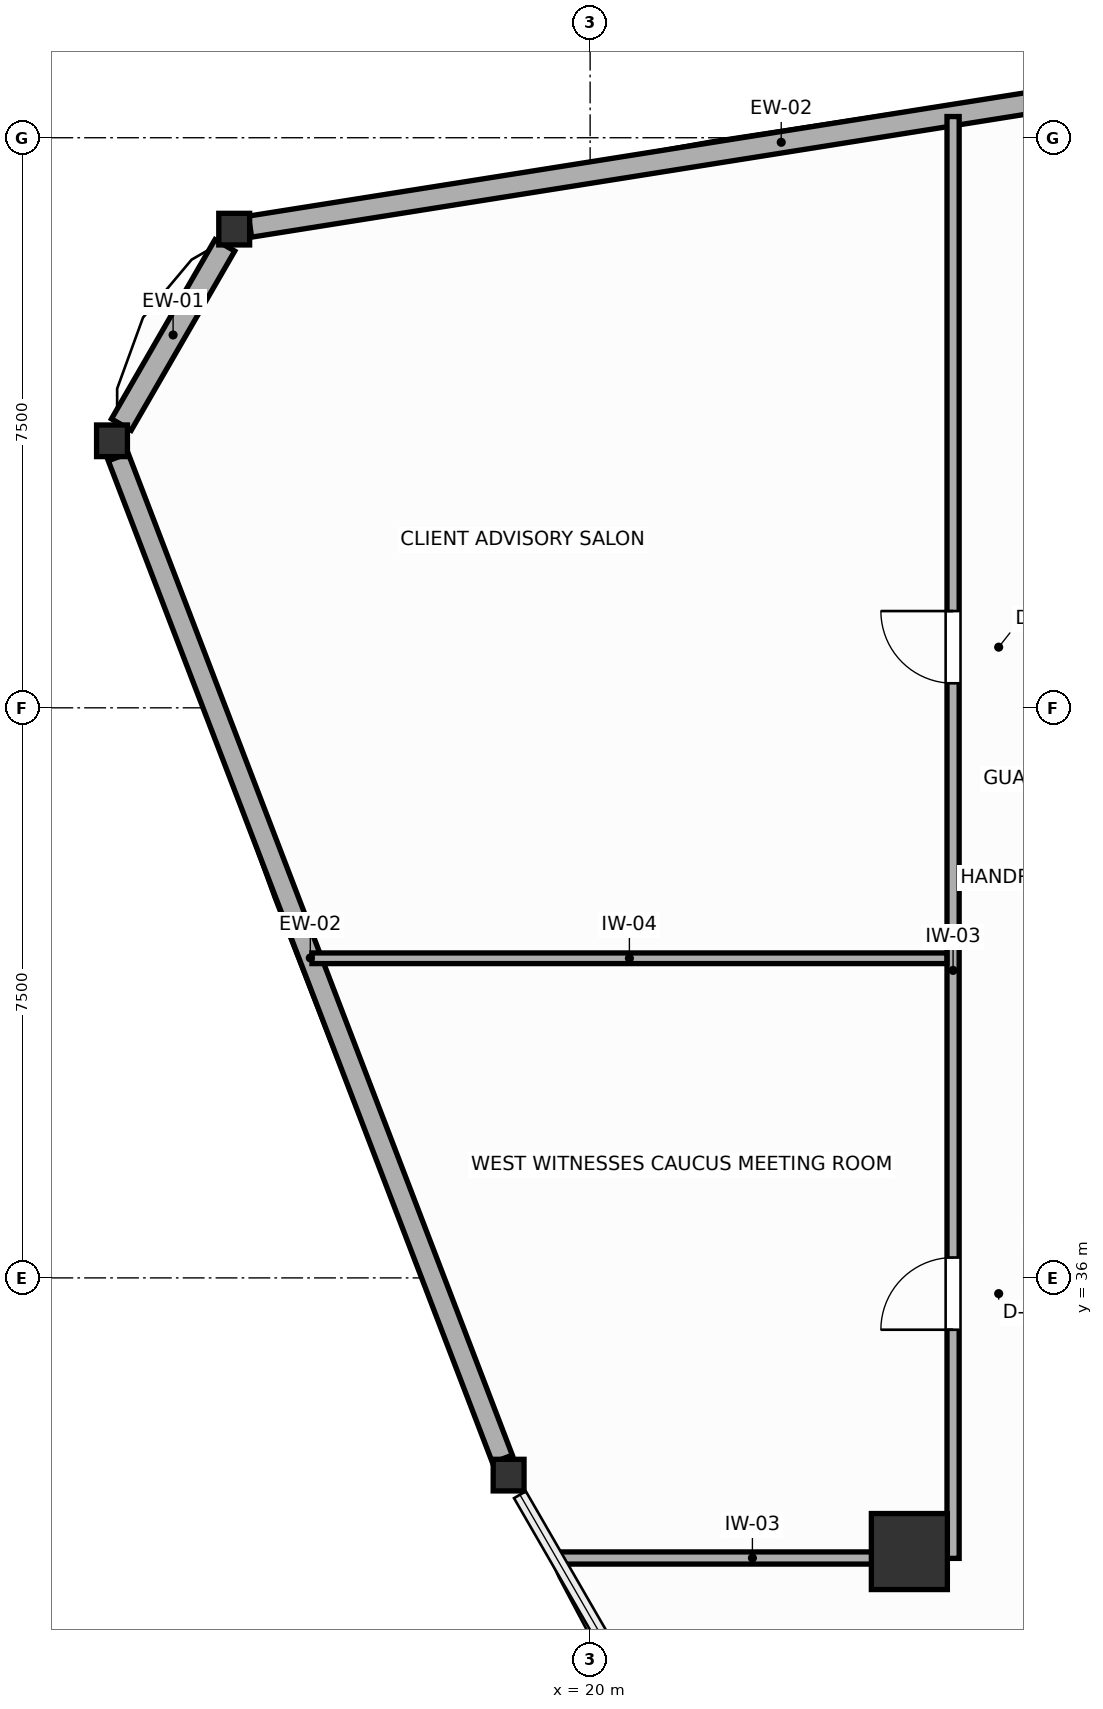
"""IFC4 building model, lengths in metres.
Left out: names, types, materials, properties, quantities, classifications, styles, units other than length and angle.
Written with IfcOpenShell. Run it as: python <this file> out.ifc"""

import sys

from ifc_helpers import new_model, si_unit, direction, frame, frame_2d, origin, origin_2d, place, context, subcontext, project, spatial, rectangle, i_section, extrude, source, transform, mapped, element, fill, save


model = new_model("IFC4")
c1 = context("Model", 3, precision=1e-05, world=origin(), true_north=direction((0.0, 1.0)))
c2 = subcontext(c1, "Body", "Model", "MODEL_VIEW")
j1 = project(units=[si_unit("LENGTHUNIT", "METRE"), si_unit("PLANEANGLEUNIT", "RADIAN")], contexts=[c1])
p1 = place(None, origin())
s1 = spatial("IfcSite", under=j1, at=p1, CompositionType="ELEMENT")
p2 = place(p1, origin())
s2 = spatial("IfcBuilding", under=s1, at=p2, CompositionType="ELEMENT")
p3 = place(p2, frame((0.0, 0.0, 183.0)))
s3 = spatial("IfcBuildingStorey", under=s2, at=p3, CompositionType="ELEMENT", Elevation=183.0)
m1 = source(origin(), c2, "Body", "SweptSolid", [
    extrude(rectangle(XDim=1.0, YDim=1.0, at=origin_2d()), origin(), (0.0, 0.0, 1.0), 3.6),
])
p4 = place(p3, frame((24.2, 32.4, 0.0), z_axis=(0.0, 0.0, 1.0), x_axis=(1.0, 0.0, 0.0)))
e1 = element("IfcColumn", 1, at=p4, inside=s3, PredefinedType="COLUMN", context=c2, shape_type="MappedRepresentation", body=[
    mapped(m1, transform((0.0, 0.0, 0.0), scale=1.0)),
])
m2 = source(origin(), c2, "Body", "SweptSolid", [
    extrude(i_section(OverallWidth=0.406, OverallDepth=0.416, WebThickness=0.027, FlangeThickness=0.044, FilletRadius=0.015, at=origin_2d()), origin(), (0.0, 0.0, 1.0), 3.6),
])
for number, where, z_axis, x_axis in (
    (2, (15.317, 49.798, 0.0), (0.0, 0.0, 1.0), (1.0, 0.0, 0.0)),
    (3, (13.71, 47.013, 0.0), (0.0, 0.0, 1.0), (1.0, 0.0, 0.0)),
    (4, (18.927, 33.406, 0.0), (0.0, 0.0, 1.0), (1.0, 0.0, 0.0)),
):
    element("IfcColumn", number, at=place(p3, frame(where, z_axis=z_axis, x_axis=x_axis)), inside=s3, PredefinedType="COLUMN", context=c2, shape_type="MappedRepresentation", body=[
        mapped(m2, transform((0.0, 0.0, 0.0), scale=1.0)),
    ])
p5 = place(p3, frame((29.503, 52.049, 0.0), z_axis=(0.0, 0.0, 1.0), x_axis=(-0.987634086957, -0.156776625426, 0.0)))
e5 = element("IfcWall", 5, at=p5, inside=s3, PredefinedType="SOLIDWALL", context=c2, shape_type="SweptSolid", body=[
    extrude(rectangle(XDim=14.152, YDim=0.28, at=frame_2d((7.076, 0.0))), origin(), (0.0, 0.0, 1.0), 1.87),
])
p6 = place(p3, frame((15.194, 49.584, 0.0), z_axis=(0.0, 0.0, 1.0), x_axis=(-0.499947493121, -0.866055716523, 0.0)))
e6 = element("IfcWall", 6, at=p6, inside=s3, PredefinedType="SOLIDWALL", context=c2, shape_type="SweptSolid", body=[
    extrude(rectangle(XDim=2.723, YDim=0.3, at=frame_2d((1.362, 0.0))), origin(), (0.0, 0.0, 1.0), 1.87),
])
p7 = place(p3, frame((13.792, 46.8, 0.0), z_axis=(0.0, 0.0, 1.0), x_axis=(0.358033263681, -0.933708831541, 0.0)))
e7 = element("IfcWall", 7, at=p7, inside=s3, PredefinedType="SOLIDWALL", context=c2, shape_type="SweptSolid", body=[
    extrude(rectangle(XDim=14.117, YDim=0.28, at=frame_2d((7.059, 0.0))), origin(), (0.0, 0.0, 1.0), 1.87),
])
p8 = place(p3, frame((24.775, 32.31, 0.0), z_axis=(0.0, 0.0, 1.0), x_axis=(0.0, 1.0, 0.0)))
e8 = element("IfcWall", 8, at=p8, inside=s3, PredefinedType="PARTITIONING", context=c2, shape_type="SweptSolid", body=[
    extrude(rectangle(XDim=18.969, YDim=0.16, at=frame_2d((9.484, 0.0))), origin(), (0.0, 0.0, 1.0), 3.4),
])
p9 = place(p8, frame((3.008, 0.0, 0.0)))
e9 = element("IfcOpeningElement", 9, at=p9, cuts=e8, PredefinedType="OPENING", context=c2, shape_type="SweptSolid", body=[
    extrude(rectangle(XDim=0.95, YDim=2.05, at=frame_2d((0.475, 1.025))), frame((0.0, 0.09, 0.0), z_axis=(0.0, -1.0, 0.0), x_axis=(1.0, 0.0, 0.0)), (0.0, 0.0, 1.0), 0.18),
])
p10 = place(p8, frame((11.513, 0.0, 0.0)))
e10 = element("IfcOpeningElement", 10, at=p10, cuts=e8, PredefinedType="OPENING", context=c2, shape_type="SweptSolid", body=[
    extrude(rectangle(XDim=0.95, YDim=2.05, at=frame_2d((0.475, 1.025))), frame((0.0, 0.09, 0.0), z_axis=(0.0, -1.0, 0.0), x_axis=(1.0, 0.0, 0.0)), (0.0, 0.0, 1.0), 0.18),
])
p11 = place(p3, frame((19.577, 32.315, 0.0), z_axis=(0.0, 0.0, 1.0), x_axis=(1.0, 0.0, 0.0)))
e11 = element("IfcWall", 11, at=p11, inside=s3, PredefinedType="PARTITIONING", context=c2, shape_type="SweptSolid", body=[
    extrude(rectangle(XDim=5.116, YDim=0.16, at=frame_2d((2.558, 0.0))), origin(), (0.0, 0.0, 1.0), 2.16),
])
p12 = place(p3, frame((16.34, 40.205, 0.0), z_axis=(0.0, 0.0, 1.0), x_axis=(1.0, 0.0, 0.0)))
e12 = element("IfcWall", 12, at=p12, inside=s3, PredefinedType="PARTITIONING", context=c2, shape_type="SweptSolid", body=[
    extrude(rectangle(XDim=8.353, YDim=0.14, at=frame_2d((4.176, 0.0))), origin(), (0.0, 0.0, 1.0), 3.4),
])
p13 = place(p9, origin())
e13 = element("IfcDoor", 13, at=p13, inside=s3, OperationType="SINGLE_SWING_LEFT", PredefinedType="DOOR", context=c2, shape_type="SweptSolid", body=[
    extrude(rectangle(XDim=0.95, YDim=2.05, at=frame_2d((0.475, 1.025))), frame((0.0, 0.025, 0.0), z_axis=(0.0, -1.0, 0.0), x_axis=(1.0, 0.0, 0.0)), (0.0, 0.0, 1.0), 0.05),
])
fill(e9, e13)
p14 = place(p10, origin())
e14 = element("IfcDoor", 14, at=p14, inside=s3, OperationType="SINGLE_SWING_RIGHT", PredefinedType="DOOR", context=c2, shape_type="SweptSolid", body=[
    extrude(rectangle(XDim=0.95, YDim=2.05, at=frame_2d((0.475, 1.025))), frame((0.0, 0.025, 0.0), z_axis=(0.0, -1.0, 0.0), x_axis=(1.0, 0.0, 0.0)), (0.0, 0.0, 1.0), 0.05),
])
fill(e10, e14)
save(model, sys.argv[1])
